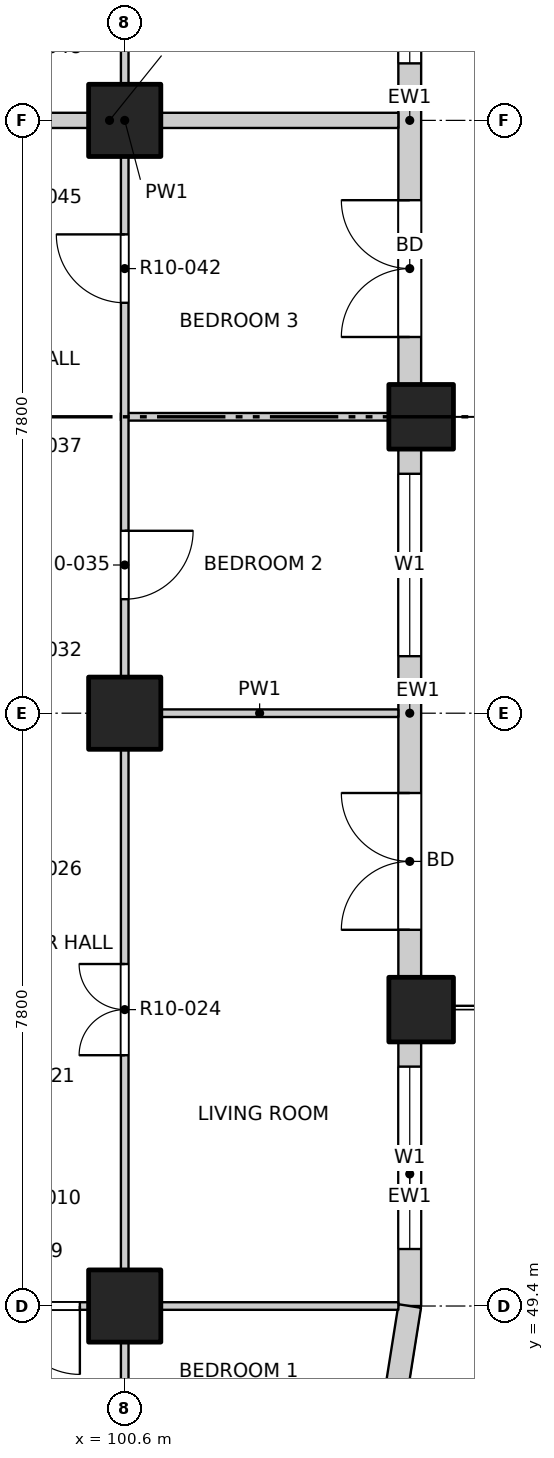
"""IFC4 building model, lengths in metres.
Left out: names, types, materials, properties, quantities, classifications, styles, units other than length and angle.
Written with IfcOpenShell. Run it as: python <this file> out.ifc"""

import sys

from ifc_helpers import new_model, si_unit, direction, frame, frame_2d, origin, origin_2d, place, context, subcontext, project, spatial, rectangle, extrude, element, fill, save


model = new_model("IFC4")
c1 = context("Model", 3, precision=1e-05, world=origin(), true_north=direction((0.0, 1.0)))
c2 = subcontext(c1, "Body", "Model", "MODEL_VIEW")
j1 = project(units=[si_unit("LENGTHUNIT", "METRE"), si_unit("PLANEANGLEUNIT", "RADIAN")], contexts=[c1])
p1 = place(None, origin())
s1 = spatial("IfcSite", under=j1, at=p1, CompositionType="ELEMENT")
p2 = place(p1, origin())
s2 = spatial("IfcBuilding", under=s1, at=p2, CompositionType="ELEMENT")
p3 = place(p2, frame((0.0, 0.0, 127.1)))
s3 = spatial("IfcBuildingStorey", under=s2, at=p3, CompositionType="ELEMENT", Elevation=127.1)
for number, where, z_axis, x_axis in (
    (1, (104.5, 53.3, -0.25), (0.0, 0.0, 1.0), (1.0, 0.0, 0.0)),
    (2, (104.5, 61.1, -0.25), (0.0, 0.0, 1.0), (1.0, 0.0, 0.0)),
):
    element("IfcColumn", number, at=place(p3, frame(where, z_axis=z_axis, x_axis=x_axis)), inside=s3, PredefinedType="COLUMN", context=c2, shape_type="SweptSolid", body=[
        extrude(rectangle(XDim=0.85, YDim=0.85, at=origin_2d()), origin(), (0.0, 0.0, 1.0), 3.4),
    ])
for number, where, z_axis, x_axis in (
    (3, (100.6, 49.4, -0.25), (0.0, 0.0, 1.0), (1.0, 0.0, 0.0)),
    (4, (100.6, 57.2, -0.25), (0.0, 0.0, 1.0), (1.0, 0.0, 0.0)),
    (5, (100.6, 65.0, -0.25), (0.0, 0.0, 1.0), (1.0, 0.0, 0.0)),
):
    element("IfcColumn", number, at=place(p3, frame(where, z_axis=z_axis, x_axis=x_axis)), inside=s3, PredefinedType="COLUMN", context=c2, shape_type="SweptSolid", body=[
        extrude(rectangle(XDim=0.95, YDim=0.95, at=origin_2d()), origin(), (0.0, 0.0, 1.0), 3.4),
    ])
p4 = place(p3, frame((104.35, 49.4, 0.0), z_axis=(0.0, 0.0, 1.0), x_axis=(0.0, 1.0, 0.0)))
e6 = element("IfcWall", 6, at=p4, inside=s3, PredefinedType="SOLIDWALL", context=c2, shape_type="SweptSolid", body=[
    extrude(rectangle(XDim=3.475, YDim=0.3, at=frame_2d((1.738, 0.0))), origin(), (0.0, 0.0, 1.0), 2.7),
])
p5 = place(p4, frame((0.75, 0.0, 0.9)))
e7 = element("IfcOpeningElement", 7, at=p5, cuts=e6, PredefinedType="OPENING", context=c2, shape_type="SweptSolid", body=[
    extrude(rectangle(XDim=2.4, YDim=1.8, at=frame_2d((1.2, 0.9))), frame((0.0, 0.16, 0.0), z_axis=(0.0, -1.0, 0.0), x_axis=(1.0, 0.0, 0.0)), (0.0, 0.0, 1.0), 0.32),
])
p6 = place(p3, frame((104.35, 53.725, 0.0), z_axis=(0.0, 0.0, 1.0), x_axis=(0.0, 1.0, 0.0)))
e8 = element("IfcWall", 8, at=p6, inside=s3, PredefinedType="SOLIDWALL", context=c2, shape_type="SweptSolid", body=[
    extrude(rectangle(XDim=6.95, YDim=0.3, at=frame_2d((3.475, 0.0))), origin(), (0.0, 0.0, 1.0), 2.7),
])
p7 = place(p6, frame((0.625, 0.0, 0.0)))
e9 = element("IfcOpeningElement", 9, at=p7, cuts=e8, PredefinedType="OPENING", context=c2, shape_type="SweptSolid", body=[
    extrude(rectangle(XDim=1.8, YDim=2.4, at=frame_2d((0.9, 1.2))), frame((0.0, 0.16, 0.0), z_axis=(0.0, -1.0, 0.0), x_axis=(1.0, 0.0, 0.0)), (0.0, 0.0, 1.0), 0.32),
])
p8 = place(p6, frame((4.225, 0.0, 0.9)))
e10 = element("IfcOpeningElement", 10, at=p8, cuts=e8, PredefinedType="OPENING", context=c2, shape_type="SweptSolid", body=[
    extrude(rectangle(XDim=2.4, YDim=1.8, at=frame_2d((1.2, 0.9))), frame((0.0, 0.16, 0.0), z_axis=(0.0, -1.0, 0.0), x_axis=(1.0, 0.0, 0.0)), (0.0, 0.0, 1.0), 0.32),
])
p9 = place(p3, frame((104.35, 61.525, 0.0), z_axis=(0.0, 0.0, 1.0), x_axis=(0.0, 1.0, 0.0)))
e11 = element("IfcWall", 11, at=p9, inside=s3, PredefinedType="SOLIDWALL", context=c2, shape_type="SweptSolid", body=[
    extrude(rectangle(XDim=6.95, YDim=0.3, at=frame_2d((3.475, 0.0))), origin(), (0.0, 0.0, 1.0), 2.7),
])
p10 = place(p9, frame((0.625, 0.0, 0.0)))
e12 = element("IfcOpeningElement", 12, at=p10, cuts=e11, PredefinedType="OPENING", context=c2, shape_type="SweptSolid", body=[
    extrude(rectangle(XDim=1.8, YDim=2.4, at=frame_2d((0.9, 1.2))), frame((0.0, 0.16, 0.0), z_axis=(0.0, -1.0, 0.0), x_axis=(1.0, 0.0, 0.0)), (0.0, 0.0, 1.0), 0.32),
])
p11 = place(p9, frame((4.225, 0.0, 0.9)))
e13 = element("IfcOpeningElement", 13, at=p11, cuts=e11, PredefinedType="OPENING", context=c2, shape_type="SweptSolid", body=[
    extrude(rectangle(XDim=2.4, YDim=1.8, at=frame_2d((1.2, 0.9))), frame((0.0, 0.16, 0.0), z_axis=(0.0, -1.0, 0.0), x_axis=(1.0, 0.0, 0.0)), (0.0, 0.0, 1.0), 0.32),
])
p12 = place(p3, frame((104.167, 48.241, 0.0), z_axis=(0.0, 0.0, 1.0), x_axis=(0.156496880861, 0.987678452879, 0.0)))
e14 = element("IfcWall", 14, at=p12, inside=s3, PredefinedType="SOLIDWALL", context=c2, shape_type="SweptSolid", body=[
    extrude(rectangle(XDim=1.173, YDim=0.3, at=frame_2d((0.586, 0.0))), origin(), (0.0, 0.0, 1.0), 2.7),
])
p13 = place(p3, frame((65.8, 49.4, 0.0), z_axis=(0.0, 0.0, 1.0), x_axis=(1.0, 0.0, 0.0)))
e15 = element("IfcWall", 15, at=p13, inside=s3, PredefinedType="PARTITIONING", context=c2, shape_type="SweptSolid", body=[
    extrude(rectangle(XDim=38.4, YDim=0.1, at=frame_2d((19.2, 0.0))), origin(), (0.0, 0.0, 1.0), 3.15),
])
p14 = place(p13, frame((4.19, 0.0, 0.0)))
e16 = element("IfcOpeningElement", 16, at=p14, cuts=e15, PredefinedType="OPENING", context=c2, shape_type="SweptSolid", body=[
    extrude(rectangle(XDim=0.9, YDim=2.1, at=frame_2d((0.45, 1.05))), frame((0.0, 0.06, 0.0), z_axis=(0.0, -1.0, 0.0), x_axis=(1.0, 0.0, 0.0)), (0.0, 0.0, 1.0), 0.12),
])
p15 = place(p13, frame((9.0, 0.0, 0.0)))
e17 = element("IfcOpeningElement", 17, at=p15, cuts=e15, PredefinedType="OPENING", context=c2, shape_type="SweptSolid", body=[
    extrude(rectangle(XDim=0.9, YDim=2.1, at=frame_2d((0.45, 1.05))), frame((0.0, 0.06, 0.0), z_axis=(0.0, -1.0, 0.0), x_axis=(1.0, 0.0, 0.0)), (0.0, 0.0, 1.0), 0.12),
])
p16 = place(p13, frame((12.9, 0.0, 0.0)))
e18 = element("IfcOpeningElement", 18, at=p16, cuts=e15, PredefinedType="OPENING", context=c2, shape_type="SweptSolid", body=[
    extrude(rectangle(XDim=0.9, YDim=2.1, at=frame_2d((0.45, 1.05))), frame((0.0, 0.06, 0.0), z_axis=(0.0, -1.0, 0.0), x_axis=(1.0, 0.0, 0.0)), (0.0, 0.0, 1.0), 0.12),
])
p17 = place(p13, frame((16.8, 0.0, 0.0)))
e19 = element("IfcOpeningElement", 19, at=p17, cuts=e15, PredefinedType="OPENING", context=c2, shape_type="SweptSolid", body=[
    extrude(rectangle(XDim=0.9, YDim=2.1, at=frame_2d((0.45, 1.05))), frame((0.0, 0.06, 0.0), z_axis=(0.0, -1.0, 0.0), x_axis=(1.0, 0.0, 0.0)), (0.0, 0.0, 1.0), 0.12),
])
p18 = place(p13, frame((22.5, 0.0, 0.0)))
e20 = element("IfcOpeningElement", 20, at=p18, cuts=e15, PredefinedType="OPENING", context=c2, shape_type="SweptSolid", body=[
    extrude(rectangle(XDim=1.2, YDim=2.1, at=frame_2d((0.6, 1.05))), frame((0.0, 0.06, 0.0), z_axis=(0.0, -1.0, 0.0), x_axis=(1.0, 0.0, 0.0)), (0.0, 0.0, 1.0), 0.12),
])
p19 = place(p13, frame((28.5, 0.0, 0.0)))
e21 = element("IfcOpeningElement", 21, at=p19, cuts=e15, PredefinedType="OPENING", context=c2, shape_type="SweptSolid", body=[
    extrude(rectangle(XDim=0.9, YDim=2.1, at=frame_2d((0.45, 1.05))), frame((0.0, 0.06, 0.0), z_axis=(0.0, -1.0, 0.0), x_axis=(1.0, 0.0, 0.0)), (0.0, 0.0, 1.0), 0.12),
])
p20 = place(p13, frame((33.31, 0.0, 0.0)))
e22 = element("IfcOpeningElement", 22, at=p20, cuts=e15, PredefinedType="OPENING", context=c2, shape_type="SweptSolid", body=[
    extrude(rectangle(XDim=0.9, YDim=2.1, at=frame_2d((0.45, 1.05))), frame((0.0, 0.06, 0.0), z_axis=(0.0, -1.0, 0.0), x_axis=(1.0, 0.0, 0.0)), (0.0, 0.0, 1.0), 0.12),
])
p21 = place(p3, frame((100.55, 57.2, 0.0), z_axis=(0.0, 0.0, 1.0), x_axis=(1.0, 0.0, 0.0)))
e23 = element("IfcWall", 23, at=p21, inside=s3, PredefinedType="PARTITIONING", context=c2, shape_type="SweptSolid", body=[
    extrude(rectangle(XDim=3.65, YDim=0.1, at=frame_2d((1.825, 0.0))), origin(), (0.0, 0.0, 1.0), 3.15),
])
p22 = place(p3, frame((100.55, 61.1, 0.0), z_axis=(0.0, 0.0, 1.0), x_axis=(1.0, 0.0, 0.0)))
e24 = element("IfcWall", 24, at=p22, inside=s3, PredefinedType="PARTITIONING", context=c2, shape_type="SweptSolid", body=[
    extrude(rectangle(XDim=3.65, YDim=0.1, at=frame_2d((1.825, 0.0))), origin(), (0.0, 0.0, 1.0), 2.55),
])
p23 = place(p3, frame((96.6, 65.0, 0.0), z_axis=(0.0, 0.0, 1.0), x_axis=(1.0, 0.0, 0.0)))
e25 = element("IfcWall", 25, at=p23, inside=s3, PredefinedType="PARTITIONING", context=c2, shape_type="SweptSolid", body=[
    extrude(rectangle(XDim=7.6, YDim=0.2, at=frame_2d((3.8, 0.0))), origin(), (0.0, 0.0, 1.0), 3.15),
])
p24 = place(p3, frame((100.6, 45.8, 0.0), z_axis=(0.0, 0.0, 1.0), x_axis=(0.0, 1.0, 0.0)))
e26 = element("IfcWall", 26, at=p24, inside=s3, PredefinedType="PARTITIONING", context=c2, shape_type="SweptSolid", body=[
    extrude(rectangle(XDim=38.4, YDim=0.1, at=frame_2d((19.2, 0.0))), origin(), (0.0, 0.0, 1.0), 3.15),
])
p25 = place(p24, frame((1.05, 0.0, 0.0)))
e27 = element("IfcOpeningElement", 27, at=p25, cuts=e26, PredefinedType="OPENING", context=c2, shape_type="SweptSolid", body=[
    extrude(rectangle(XDim=1.2, YDim=2.1, at=frame_2d((0.6, 1.05))), frame((0.0, 0.06, 0.0), z_axis=(0.0, -1.0, 0.0), x_axis=(1.0, 0.0, 0.0)), (0.0, 0.0, 1.0), 0.12),
])
p26 = place(p24, frame((6.9, 0.0, 0.0)))
e28 = element("IfcOpeningElement", 28, at=p26, cuts=e26, PredefinedType="OPENING", context=c2, shape_type="SweptSolid", body=[
    extrude(rectangle(XDim=1.2, YDim=2.1, at=frame_2d((0.6, 1.05))), frame((0.0, 0.06, 0.0), z_axis=(0.0, -1.0, 0.0), x_axis=(1.0, 0.0, 0.0)), (0.0, 0.0, 1.0), 0.12),
])
p27 = place(p24, frame((12.9, 0.0, 0.0)))
e29 = element("IfcOpeningElement", 29, at=p27, cuts=e26, PredefinedType="OPENING", context=c2, shape_type="SweptSolid", body=[
    extrude(rectangle(XDim=0.9, YDim=2.1, at=frame_2d((0.45, 1.05))), frame((0.0, 0.06, 0.0), z_axis=(0.0, -1.0, 0.0), x_axis=(1.0, 0.0, 0.0)), (0.0, 0.0, 1.0), 0.12),
])
p28 = place(p24, frame((16.8, 0.0, 0.0)))
e30 = element("IfcOpeningElement", 30, at=p28, cuts=e26, PredefinedType="OPENING", context=c2, shape_type="SweptSolid", body=[
    extrude(rectangle(XDim=0.9, YDim=2.1, at=frame_2d((0.45, 1.05))), frame((0.0, 0.06, 0.0), z_axis=(0.0, -1.0, 0.0), x_axis=(1.0, 0.0, 0.0)), (0.0, 0.0, 1.0), 0.12),
])
p29 = place(p24, frame((20.7, 0.0, 0.0)))
e31 = element("IfcOpeningElement", 31, at=p29, cuts=e26, PredefinedType="OPENING", context=c2, shape_type="SweptSolid", body=[
    extrude(rectangle(XDim=0.9, YDim=2.1, at=frame_2d((0.45, 1.05))), frame((0.0, 0.06, 0.0), z_axis=(0.0, -1.0, 0.0), x_axis=(1.0, 0.0, 0.0)), (0.0, 0.0, 1.0), 0.12),
])
p30 = place(p24, frame((27.575, 0.0, 0.0)))
e32 = element("IfcOpeningElement", 32, at=p30, cuts=e26, PredefinedType="OPENING", context=c2, shape_type="SweptSolid", body=[
    extrude(rectangle(XDim=1.2, YDim=2.1, at=frame_2d((0.6, 1.05))), frame((0.0, 0.06, 0.0), z_axis=(0.0, -1.0, 0.0), x_axis=(1.0, 0.0, 0.0)), (0.0, 0.0, 1.0), 0.12),
])
p31 = place(p24, frame((32.4, 0.0, 0.0)))
e33 = element("IfcOpeningElement", 33, at=p31, cuts=e26, PredefinedType="OPENING", context=c2, shape_type="SweptSolid", body=[
    extrude(rectangle(XDim=0.9, YDim=2.1, at=frame_2d((0.45, 1.05))), frame((0.0, 0.06, 0.0), z_axis=(0.0, -1.0, 0.0), x_axis=(1.0, 0.0, 0.0)), (0.0, 0.0, 1.0), 0.12),
])
p32 = place(p24, frame((36.15, 0.0, 0.0)))
e34 = element("IfcOpeningElement", 34, at=p32, cuts=e26, PredefinedType="OPENING", context=c2, shape_type="SweptSolid", body=[
    extrude(rectangle(XDim=1.2, YDim=2.1, at=frame_2d((0.6, 1.05))), frame((0.0, 0.06, 0.0), z_axis=(0.0, -1.0, 0.0), x_axis=(1.0, 0.0, 0.0)), (0.0, 0.0, 1.0), 0.12),
])
p33 = place(p5, origin())
e35 = element("IfcWindow", 35, at=p33, inside=s3, PartitioningType="DOUBLE_PANEL_VERTICAL", PredefinedType="WINDOW", context=c2, shape_type="SweptSolid", body=[
    extrude(rectangle(XDim=2.4, YDim=1.8, at=frame_2d((1.2, 0.9))), frame((0.0, 0.03, 0.0), z_axis=(0.0, -1.0, 0.0), x_axis=(1.0, 0.0, 0.0)), (0.0, 0.0, 1.0), 0.06),
])
fill(e7, e35)
p34 = place(p7, origin())
e36 = element("IfcDoor", 36, at=p34, inside=s3, OperationType="DOUBLE_DOOR_SINGLE_SWING", PredefinedType="DOOR", context=c2, shape_type="SweptSolid", body=[
    extrude(rectangle(XDim=1.8, YDim=2.4, at=frame_2d((0.9, 1.2))), frame((0.0, 0.025, 0.0), z_axis=(0.0, -1.0, 0.0), x_axis=(1.0, 0.0, 0.0)), (0.0, 0.0, 1.0), 0.05),
])
fill(e9, e36)
p35 = place(p8, origin())
e37 = element("IfcWindow", 37, at=p35, inside=s3, PartitioningType="DOUBLE_PANEL_VERTICAL", PredefinedType="WINDOW", context=c2, shape_type="SweptSolid", body=[
    extrude(rectangle(XDim=2.4, YDim=1.8, at=frame_2d((1.2, 0.9))), frame((0.0, 0.03, 0.0), z_axis=(0.0, -1.0, 0.0), x_axis=(1.0, 0.0, 0.0)), (0.0, 0.0, 1.0), 0.06),
])
fill(e10, e37)
p36 = place(p10, origin())
e38 = element("IfcDoor", 38, at=p36, inside=s3, OperationType="DOUBLE_DOOR_SINGLE_SWING", PredefinedType="DOOR", context=c2, shape_type="SweptSolid", body=[
    extrude(rectangle(XDim=1.8, YDim=2.4, at=frame_2d((0.9, 1.2))), frame((0.0, 0.025, 0.0), z_axis=(0.0, -1.0, 0.0), x_axis=(1.0, 0.0, 0.0)), (0.0, 0.0, 1.0), 0.05),
])
fill(e12, e38)
p37 = place(p11, origin())
e39 = element("IfcWindow", 39, at=p37, inside=s3, PartitioningType="DOUBLE_PANEL_VERTICAL", PredefinedType="WINDOW", context=c2, shape_type="SweptSolid", body=[
    extrude(rectangle(XDim=2.4, YDim=1.8, at=frame_2d((1.2, 0.9))), frame((0.0, 0.03, 0.0), z_axis=(0.0, -1.0, 0.0), x_axis=(1.0, 0.0, 0.0)), (0.0, 0.0, 1.0), 0.06),
])
fill(e13, e39)
p38 = place(p20, origin())
e40 = element("IfcDoor", 40, at=p38, inside=s3, OperationType="SINGLE_SWING_LEFT", PredefinedType="DOOR", context=c2, shape_type="SweptSolid", body=[
    extrude(rectangle(XDim=0.9, YDim=2.1, at=frame_2d((0.45, 1.05))), frame((0.0, 0.025, 0.0), z_axis=(0.0, -1.0, 0.0), x_axis=(1.0, 0.0, 0.0)), (0.0, 0.0, 1.0), 0.05),
])
fill(e22, e40)
p39 = place(p26, origin())
e41 = element("IfcDoor", 41, at=p39, inside=s3, OperationType="DOUBLE_DOOR_SINGLE_SWING", PredefinedType="DOOR", context=c2, shape_type="SweptSolid", body=[
    extrude(rectangle(XDim=1.2, YDim=2.1, at=frame_2d((0.6, 1.05))), frame((0.0, 0.025, 0.0), z_axis=(0.0, -1.0, 0.0), x_axis=(1.0, 0.0, 0.0)), (0.0, 0.0, 1.0), 0.05),
])
fill(e28, e41)
p40 = place(p27, origin())
e42 = element("IfcDoor", 42, at=p40, inside=s3, OperationType="SINGLE_SWING_LEFT", PredefinedType="DOOR", context=c2, shape_type="SweptSolid", body=[
    extrude(rectangle(XDim=0.9, YDim=2.1, at=frame_2d((0.45, 1.05))), frame((0.0, 0.025, 0.0), z_axis=(0.0, -1.0, 0.0), x_axis=(1.0, 0.0, 0.0)), (0.0, 0.0, 1.0), 0.05),
])
fill(e29, e42)
p41 = place(p28, origin())
e43 = element("IfcDoor", 43, at=p41, inside=s3, OperationType="SINGLE_SWING_RIGHT", PredefinedType="DOOR", context=c2, shape_type="SweptSolid", body=[
    extrude(rectangle(XDim=0.9, YDim=2.1, at=frame_2d((0.45, 1.05))), frame((0.0, 0.025, 0.0), z_axis=(0.0, -1.0, 0.0), x_axis=(1.0, 0.0, 0.0)), (0.0, 0.0, 1.0), 0.05),
])
fill(e30, e43)
save(model, sys.argv[1])
